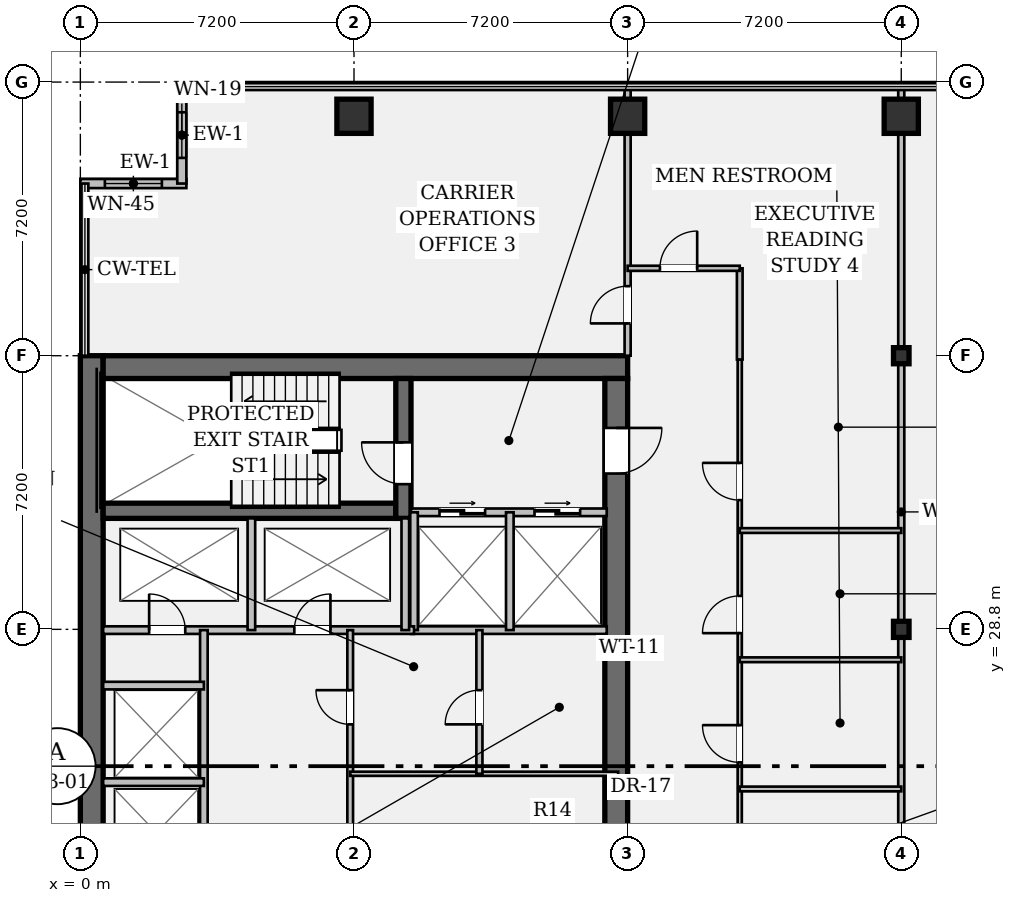
"""IFC4 building model, lengths in metres.
Left out: names, types, materials, properties, quantities, classifications, styles, units other than length and angle.
Written with IfcOpenShell. Run it as: python <this file> out.ifc"""

import sys

from ifc_helpers import new_model, si_unit, direction, frame, frame_2d, origin, origin_2d, place, context, subcontext, project, spatial, rectangle, hollow_rectangle, i_section, extrude, element, fill, save


model = new_model("IFC4")
c1 = context("Model", 3, precision=1e-05, world=origin(), true_north=direction((0.0, 1.0)))
c2 = subcontext(c1, "Body", "Model", "MODEL_VIEW")
j1 = project(units=[si_unit("LENGTHUNIT", "METRE"), si_unit("PLANEANGLEUNIT", "RADIAN")], contexts=[c1])
p1 = place(None, origin())
s1 = spatial("IfcSite", under=j1, at=p1, CompositionType="ELEMENT")
p2 = place(p1, origin())
s2 = spatial("IfcBuilding", under=s1, at=p2, CompositionType="ELEMENT")
p3 = place(p2, frame((0.0, 0.0, 129.15)))
s3 = spatial("IfcBuildingStorey", under=s2, at=p3, CompositionType="ELEMENT", Elevation=129.15)
p4 = place(p3, frame((0.3, 7.2, 0.0), z_axis=(0.0, 0.0, 1.0), x_axis=(0.0, 1.0, 0.0)))
e1 = element("IfcWall", 1, at=p4, inside=s3, PredefinedType="SHEAR", context=c2, shape_type="SweptSolid", body=[
    extrude(rectangle(XDim=28.8, YDim=0.6, at=frame_2d((14.4, 0.0))), origin(), (0.0, 0.0, 1.0), 3.58),
])
p5 = place(p3, frame((0.6, 35.7, 0.0), z_axis=(0.0, 0.0, 1.0), x_axis=(1.0, 0.0, 0.0)))
e2 = element("IfcWall", 2, at=p5, inside=s3, PredefinedType="SHEAR", context=c2, shape_type="SweptSolid", body=[
    extrude(rectangle(XDim=13.8, YDim=0.6, at=frame_2d((6.9, 0.0))), origin(), (0.0, 0.0, 1.0), 3.58),
])
p6 = place(p3, frame((14.1, 35.4, 0.0), z_axis=(0.0, 0.0, 1.0), x_axis=(0.0, -1.0, 0.0)))
e3 = element("IfcWall", 3, at=p6, inside=s3, PredefinedType="SHEAR", context=c2, shape_type="SweptSolid", body=[
    extrude(rectangle(XDim=27.6, YDim=0.6, at=frame_2d((13.8, 0.0))), origin(), (0.0, 0.0, 1.0), 3.58),
])
p7 = place(p6, frame((1.3, 0.0, 0.0)))
e4 = element("IfcOpeningElement", 4, at=p7, cuts=e3, PredefinedType="OPENING", context=c2, shape_type="SweptSolid", body=[
    extrude(rectangle(XDim=1.2, YDim=2.15, at=frame_2d((0.6, 1.075))), frame((0.0, 0.312, 0.0), z_axis=(0.0, -1.0, 0.0), x_axis=(1.0, 0.0, 0.0)), (0.0, 0.0, 1.0), 0.624),
])
p8 = place(p6, frame((25.25, 0.0, 0.0)))
e5 = element("IfcOpeningElement", 5, at=p8, cuts=e3, PredefinedType="OPENING", context=c2, shape_type="SweptSolid", body=[
    extrude(rectangle(XDim=1.2, YDim=2.15, at=frame_2d((0.6, 1.075))), frame((0.0, 0.312, 0.0), z_axis=(0.0, -1.0, 0.0), x_axis=(1.0, 0.0, 0.0)), (0.0, 0.0, 1.0), 0.624),
])
p9 = place(p6, frame((14.6, 0.0, 0.0)))
e6 = element("IfcOpeningElement", 6, at=p9, cuts=e3, PredefinedType="OPENING", context=c2, shape_type="SweptSolid", body=[
    extrude(rectangle(XDim=1.6, YDim=2.2, at=frame_2d((0.8, 1.1))), frame((0.0, 0.312, 0.0), z_axis=(0.0, -1.0, 0.0), x_axis=(1.0, 0.0, 0.0)), (0.0, 0.0, 1.0), 0.624),
])
p10 = place(p3, frame((0.6, 31.92, 0.0), z_axis=(0.0, 0.0, 1.0), x_axis=(1.0, 0.0, 0.0)))
e7 = element("IfcWall", 7, at=p10, inside=s3, PredefinedType="SHEAR", context=c2, shape_type="SweptSolid", body=[
    extrude(rectangle(XDim=7.7, YDim=0.4, at=frame_2d((3.85, 0.0))), origin(), (0.0, 0.0, 1.0), 3.58),
])
p11 = place(p3, frame((8.5, 31.72, 0.0), z_axis=(0.0, 0.0, 1.0), x_axis=(0.0, 1.0, 0.0)))
e8 = element("IfcWall", 8, at=p11, inside=s3, PredefinedType="SHEAR", context=c2, shape_type="SweptSolid", body=[
    extrude(rectangle(XDim=3.68, YDim=0.4, at=frame_2d((1.84, 0.0))), origin(), (0.0, 0.0, 1.0), 3.58),
])
p12 = place(p11, frame((0.9, 0.0, 0.0)))
e9 = element("IfcOpeningElement", 9, at=p12, cuts=e8, PredefinedType="OPENING", context=c2, shape_type="SweptSolid", body=[
    extrude(rectangle(XDim=1.1, YDim=2.15, at=frame_2d((0.55, 1.075))), frame((0.0, 0.212, 0.0), z_axis=(0.0, -1.0, 0.0), x_axis=(1.0, 0.0, 0.0)), (0.0, 0.0, 1.0), 0.424),
])
for number, where, z_axis, x_axis in (
    (10, (7.2, 42.3, 0.0), (0.0, 0.0, 1.0), (1.0, 0.0, 0.0)),
    (11, (14.4, 42.3, 0.0), (0.0, 0.0, 1.0), (1.0, 0.0, 0.0)),
):
    element("IfcColumn", number, at=place(p3, frame(where, z_axis=z_axis, x_axis=x_axis)), inside=s3, PredefinedType="COLUMN", context=c2, shape_type="SweptSolid", body=[
        extrude(hollow_rectangle(XDim=0.9, YDim=0.9, WallThickness=0.055, at=origin_2d()), origin(), (0.0, 0.0, 1.0), 3.58),
    ])
for number, where, z_axis, x_axis in (
    (12, (21.6, 28.8, 0.0), (0.0, 0.0, 1.0), (1.0, 0.0, 0.0)),
    (13, (21.6, 36.0, 0.0), (0.0, 0.0, 1.0), (1.0, 0.0, 0.0)),
):
    element("IfcColumn", number, at=place(p3, frame(where, z_axis=z_axis, x_axis=x_axis)), inside=s3, PredefinedType="COLUMN", context=c2, shape_type="SweptSolid", body=[
        extrude(i_section(OverallWidth=0.409, OverallDepth=0.424, WebThickness=0.033, FlangeThickness=0.052, FilletRadius=0.018, at=origin_2d()), origin(), (0.0, 0.0, 1.0), 3.58),
    ])
p13 = place(p3, frame((21.6, 42.3, 0.0), z_axis=(0.0, 0.0, 1.0), x_axis=(1.0, 0.0, 0.0)))
e14 = element("IfcColumn", 14, at=p13, inside=s3, PredefinedType="COLUMN", context=c2, shape_type="SweptSolid", body=[
    extrude(hollow_rectangle(XDim=0.9, YDim=0.9, WallThickness=0.055, at=origin_2d()), origin(), (0.0, 0.0, 1.0), 3.58),
])
p14 = place(p3, frame((0.0, 40.53, 0.0), z_axis=(0.0, 0.0, 1.0), x_axis=(1.0, 0.0, 0.0)))
e15 = element("IfcWall", 15, at=p14, inside=s3, PredefinedType="STANDARD", context=c2, shape_type="SweptSolid", body=[
    extrude(rectangle(XDim=2.79, YDim=0.24, at=frame_2d((1.395, 0.0))), origin(), (0.0, 0.0, 1.0), 3.58),
])
p15 = place(p14, frame((0.645, 0.0, 0.95)))
e16 = element("IfcOpeningElement", 16, at=p15, cuts=e15, PredefinedType="OPENING", context=c2, shape_type="SweptSolid", body=[
    extrude(rectangle(XDim=1.5, YDim=1.8, at=frame_2d((0.75, 0.9))), frame((0.0, 0.132, 0.0), z_axis=(0.0, -1.0, 0.0), x_axis=(1.0, 0.0, 0.0)), (0.0, 0.0, 1.0), 0.264),
])
p16 = place(p3, frame((2.67, 40.53, 0.0), z_axis=(0.0, 0.0, 1.0), x_axis=(0.0, 1.0, 0.0)))
e17 = element("IfcWall", 17, at=p16, inside=s3, PredefinedType="STANDARD", context=c2, shape_type="SweptSolid", body=[
    extrude(rectangle(XDim=2.55, YDim=0.24, at=frame_2d((1.275, 0.0))), origin(), (0.0, 0.0, 1.0), 3.58),
])
p17 = place(p16, frame((0.675, 0.0, 0.95)))
e18 = element("IfcOpeningElement", 18, at=p17, cuts=e17, PredefinedType="OPENING", context=c2, shape_type="SweptSolid", body=[
    extrude(rectangle(XDim=1.2, YDim=1.8, at=frame_2d((0.6, 0.9))), frame((0.0, 0.132, 0.0), z_axis=(0.0, -1.0, 0.0), x_axis=(1.0, 0.0, 0.0)), (0.0, 0.0, 1.0), 0.264),
])
p18 = place(p3, frame((8.7, 31.88, 0.0), z_axis=(0.0, 0.0, 1.0), x_axis=(1.0, 0.0, 0.0)))
e19 = element("IfcWall", 19, at=p18, inside=s3, PredefinedType="PARTITIONING", context=c2, shape_type="SweptSolid", body=[
    extrude(rectangle(XDim=5.15, YDim=0.2, at=frame_2d((2.575, 0.0))), origin(), (0.0, 0.0, 1.0), 3.58),
])
p19 = place(p18, frame((0.75, 0.0, 0.0)))
e20 = element("IfcOpeningElement", 20, at=p19, cuts=e19, PredefinedType="OPENING", context=c2, shape_type="SweptSolid", body=[
    extrude(rectangle(XDim=1.2, YDim=2.2, at=frame_2d((0.6, 1.1))), frame((0.0, 0.112, 0.0), z_axis=(0.0, -1.0, 0.0), x_axis=(1.0, 0.0, 0.0)), (0.0, 0.0, 1.0), 0.224),
])
p20 = place(p18, frame((3.25, 0.0, 0.0)))
e21 = element("IfcOpeningElement", 21, at=p20, cuts=e19, PredefinedType="OPENING", context=c2, shape_type="SweptSolid", body=[
    extrude(rectangle(XDim=1.2, YDim=2.2, at=frame_2d((0.6, 1.1))), frame((0.0, 0.112, 0.0), z_axis=(0.0, -1.0, 0.0), x_axis=(1.0, 0.0, 0.0)), (0.0, 0.0, 1.0), 0.224),
])
p21 = place(p3, frame((8.7, 28.78, 0.0), z_axis=(0.0, 0.0, 1.0), x_axis=(1.0, 0.0, 0.0)))
e22 = element("IfcWall", 22, at=p21, inside=s3, PredefinedType="PARTITIONING", context=c2, shape_type="SweptSolid", body=[
    extrude(rectangle(XDim=5.15, YDim=0.2, at=frame_2d((2.575, 0.0))), origin(), (0.0, 0.0, 1.0), 3.58),
])
for number, where, z_axis, x_axis in (
    (23, (8.78, 28.78, 0.0), (0.0, 0.0, 1.0), (0.0, 1.0, 0.0)),
    (24, (11.3, 28.78, 0.0), (0.0, 0.0, 1.0), (0.0, 1.0, 0.0)),
):
    element("IfcWall", number, at=place(p3, frame(where, z_axis=z_axis, x_axis=x_axis)), inside=s3, PredefinedType="PARTITIONING", context=c2, shape_type="SweptSolid", body=[
        extrude(rectangle(XDim=3.1, YDim=0.2, at=frame_2d((1.55, 0.0))), origin(), (0.0, 0.0, 1.0), 3.58),
    ])
p22 = place(p3, frame((0.6, 28.78, 0.0), z_axis=(0.0, 0.0, 1.0), x_axis=(1.0, 0.0, 0.0)))
e25 = element("IfcWall", 25, at=p22, inside=s3, PredefinedType="PARTITIONING", context=c2, shape_type="SweptSolid", body=[
    extrude(rectangle(XDim=8.18, YDim=0.2, at=frame_2d((4.09, 0.0))), origin(), (0.0, 0.0, 1.0), 3.58),
])
p23 = place(p22, frame((1.21, 0.0, 0.0)))
e26 = element("IfcOpeningElement", 26, at=p23, cuts=e25, PredefinedType="OPENING", context=c2, shape_type="SweptSolid", body=[
    extrude(rectangle(XDim=0.95, YDim=2.15, at=frame_2d((0.475, 1.075))), frame((0.0, 0.112, 0.0), z_axis=(0.0, -1.0, 0.0), x_axis=(1.0, 0.0, 0.0)), (0.0, 0.0, 1.0), 0.224),
])
p24 = place(p22, frame((5.03, 0.0, 0.0)))
e27 = element("IfcOpeningElement", 27, at=p24, cuts=e25, PredefinedType="OPENING", context=c2, shape_type="SweptSolid", body=[
    extrude(rectangle(XDim=0.95, YDim=2.15, at=frame_2d((0.475, 1.075))), frame((0.0, 0.112, 0.0), z_axis=(0.0, -1.0, 0.0), x_axis=(1.0, 0.0, 0.0)), (0.0, 0.0, 1.0), 0.224),
])
for number, where, z_axis, x_axis in (
    (28, (4.5, 28.78, 0.0), (0.0, 0.0, 1.0), (0.0, 1.0, 0.0)),
    (29, (8.55, 28.78, 0.0), (0.0, 0.0, 1.0), (0.0, 1.0, 0.0)),
):
    element("IfcWall", number, at=place(p3, frame(where, z_axis=z_axis, x_axis=x_axis)), inside=s3, PredefinedType="PARTITIONING", context=c2, shape_type="SweptSolid", body=[
        extrude(rectangle(XDim=2.94, YDim=0.2, at=frame_2d((1.47, 0.0))), origin(), (0.0, 0.0, 1.0), 3.58),
    ])
p25 = place(p3, frame((3.25, 15.7, 0.0), z_axis=(0.0, 0.0, 1.0), x_axis=(0.0, 1.0, 0.0)))
e30 = element("IfcWall", 30, at=p25, inside=s3, PredefinedType="PARTITIONING", context=c2, shape_type="SweptSolid", body=[
    extrude(rectangle(XDim=13.08, YDim=0.2, at=frame_2d((6.54, 0.0))), origin(), (0.0, 0.0, 1.0), 3.58),
])
for number, where, z_axis, x_axis in (
    (31, (0.6, 24.78, 0.0), (0.0, 0.0, 1.0), (1.0, 0.0, 0.0)),
    (32, (0.6, 27.32, 0.0), (0.0, 0.0, 1.0), (1.0, 0.0, 0.0)),
):
    element("IfcWall", number, at=place(p3, frame(where, z_axis=z_axis, x_axis=x_axis)), inside=s3, PredefinedType="PARTITIONING", context=c2, shape_type="SweptSolid", body=[
        extrude(rectangle(XDim=2.65, YDim=0.2, at=frame_2d((1.325, 0.0))), origin(), (0.0, 0.0, 1.0), 3.58),
    ])
p26 = place(p3, frame((7.1, 22.2, 0.0), z_axis=(0.0, 0.0, 1.0), x_axis=(0.0, 1.0, 0.0)))
e33 = element("IfcWall", 33, at=p26, inside=s3, PredefinedType="PARTITIONING", context=c2, shape_type="SweptSolid", body=[
    extrude(rectangle(XDim=6.58, YDim=0.15, at=frame_2d((3.29, 0.0))), origin(), (0.0, 0.0, 1.0), 3.58),
])
p27 = place(p26, frame((4.1, 0.0, 0.0)))
e34 = element("IfcOpeningElement", 34, at=p27, cuts=e33, PredefinedType="OPENING", context=c2, shape_type="SweptSolid", body=[
    extrude(rectangle(XDim=0.9, YDim=2.15, at=frame_2d((0.45, 1.075))), frame((0.0, 0.087, 0.0), z_axis=(0.0, -1.0, 0.0), x_axis=(1.0, 0.0, 0.0)), (0.0, 0.0, 1.0), 0.174),
])
p28 = place(p3, frame((7.1, 25.0, 0.0), z_axis=(0.0, 0.0, 1.0), x_axis=(1.0, 0.0, 0.0)))
e35 = element("IfcWall", 35, at=p28, inside=s3, PredefinedType="PARTITIONING", context=c2, shape_type="SweptSolid", body=[
    extrude(rectangle(XDim=7.05, YDim=0.11, at=frame_2d((3.525, 0.0))), origin(), (0.0, 0.0, 1.0), 3.58),
])
p29 = place(p3, frame((10.5, 25.0, 0.0), z_axis=(0.0, 0.0, 1.0), x_axis=(0.0, 1.0, 0.0)))
e36 = element("IfcWall", 36, at=p29, inside=s3, PredefinedType="PARTITIONING", context=c2, shape_type="SweptSolid", body=[
    extrude(rectangle(XDim=3.78, YDim=0.16, at=frame_2d((1.89, 0.0))), origin(), (0.0, 0.0, 1.0), 3.58),
])
p30 = place(p29, frame((1.3, 0.0, 0.0)))
e37 = element("IfcOpeningElement", 37, at=p30, cuts=e36, PredefinedType="OPENING", context=c2, shape_type="SweptSolid", body=[
    extrude(rectangle(XDim=0.9, YDim=2.15, at=frame_2d((0.45, 1.075))), frame((0.0, 0.092, 0.0), z_axis=(0.0, -1.0, 0.0), x_axis=(1.0, 0.0, 0.0)), (0.0, 0.0, 1.0), 0.184),
])
p31 = place(p3, frame((17.35, 20.7, 0.0), z_axis=(0.0, 0.0, 1.0), x_axis=(0.0, 1.0, 0.0)))
e38 = element("IfcWall", 38, at=p31, inside=s3, PredefinedType="PARTITIONING", context=c2, shape_type="SweptSolid", body=[
    extrude(rectangle(XDim=15.2, YDim=0.11, at=frame_2d((7.6, 0.0))), origin(), (0.0, 0.0, 1.0), 2.869),
])
p32 = place(p31, frame((1.4, 0.0, 0.0)))
e39 = element("IfcOpeningElement", 39, at=p32, cuts=e38, PredefinedType="OPENING", context=c2, shape_type="SweptSolid", body=[
    extrude(rectangle(XDim=0.98, YDim=2.15, at=frame_2d((0.49, 1.075))), frame((0.0, 0.067, 0.0), z_axis=(0.0, -1.0, 0.0), x_axis=(1.0, 0.0, 0.0)), (0.0, 0.0, 1.0), 0.134),
])
p33 = place(p31, frame((4.6, 0.0, 0.0)))
e40 = element("IfcOpeningElement", 40, at=p33, cuts=e38, PredefinedType="OPENING", context=c2, shape_type="SweptSolid", body=[
    extrude(rectangle(XDim=0.98, YDim=2.15, at=frame_2d((0.49, 1.075))), frame((0.0, 0.067, 0.0), z_axis=(0.0, -1.0, 0.0), x_axis=(1.0, 0.0, 0.0)), (0.0, 0.0, 1.0), 0.134),
])
p34 = place(p31, frame((8.0, 0.0, 0.0)))
e41 = element("IfcOpeningElement", 41, at=p34, cuts=e38, PredefinedType="OPENING", context=c2, shape_type="SweptSolid", body=[
    extrude(rectangle(XDim=0.98, YDim=2.15, at=frame_2d((0.49, 1.075))), frame((0.0, 0.067, 0.0), z_axis=(0.0, -1.0, 0.0), x_axis=(1.0, 0.0, 0.0)), (0.0, 0.0, 1.0), 0.134),
])
p35 = place(p31, frame((11.5, 0.0, 0.0)))
e42 = element("IfcOpeningElement", 42, at=p35, cuts=e38, PredefinedType="OPENING", context=c2, shape_type="SweptSolid", body=[
    extrude(rectangle(XDim=0.98, YDim=2.15, at=frame_2d((0.49, 1.075))), frame((0.0, 0.067, 0.0), z_axis=(0.0, -1.0, 0.0), x_axis=(1.0, 0.0, 0.0)), (0.0, 0.0, 1.0), 0.134),
])
p36 = place(p3, frame((21.6, 20.7, 0.0), z_axis=(0.0, 0.0, 1.0), x_axis=(0.0, 1.0, 0.0)))
e43 = element("IfcWall", 43, at=p36, inside=s3, PredefinedType="PARTITIONING", context=c2, shape_type="SweptSolid", body=[
    extrude(rectangle(XDim=22.38, YDim=0.16, at=frame_2d((11.19, 0.0))), origin(), (0.0, 0.0, 1.0), 2.869),
])
for number, where, z_axis, x_axis in (
    (44, (17.35, 24.6, 0.0), (0.0, 0.0, 1.0), (1.0, 0.0, 0.0)),
    (45, (17.35, 28.0, 0.0), (0.0, 0.0, 1.0), (1.0, 0.0, 0.0)),
    (46, (17.35, 31.4, 0.0), (0.0, 0.0, 1.0), (1.0, 0.0, 0.0)),
):
    element("IfcWall", number, at=place(p3, frame(where, z_axis=z_axis, x_axis=x_axis)), inside=s3, PredefinedType="PARTITIONING", context=c2, shape_type="SweptSolid", body=[
        extrude(rectangle(XDim=4.25, YDim=0.125, at=frame_2d((2.125, 0.0))), origin(), (0.0, 0.0, 1.0), 2.869),
    ])
p37 = place(p3, frame((14.4, 36.0, 0.0), z_axis=(0.0, 0.0, 1.0), x_axis=(0.0, 1.0, 0.0)))
e47 = element("IfcWall", 47, at=p37, inside=s3, PredefinedType="PARTITIONING", context=c2, shape_type="SweptSolid", body=[
    extrude(rectangle(XDim=7.08, YDim=0.16, at=frame_2d((3.54, 0.0))), origin(), (0.0, 0.0, 1.0), 2.869),
])
p38 = place(p37, frame((0.85, 0.0, 0.0)))
e48 = element("IfcOpeningElement", 48, at=p38, cuts=e47, PredefinedType="OPENING", context=c2, shape_type="SweptSolid", body=[
    extrude(rectangle(XDim=0.98, YDim=2.15, at=frame_2d((0.49, 1.075))), frame((0.0, 0.092, 0.0), z_axis=(0.0, -1.0, 0.0), x_axis=(1.0, 0.0, 0.0)), (0.0, 0.0, 1.0), 0.184),
])
p39 = place(p3, frame((17.35, 35.9, 0.0), z_axis=(0.0, 0.0, 1.0), x_axis=(0.0, 1.0, 0.0)))
e49 = element("IfcWall", 49, at=p39, inside=s3, PredefinedType="PARTITIONING", context=c2, shape_type="SweptSolid", body=[
    extrude(rectangle(XDim=2.4, YDim=0.15, at=frame_2d((1.2, 0.0))), origin(), (0.0, 0.0, 1.0), 2.869),
])
p40 = place(p3, frame((14.4, 38.3, 0.0), z_axis=(0.0, 0.0, 1.0), x_axis=(1.0, 0.0, 0.0)))
e50 = element("IfcWall", 50, at=p40, inside=s3, PredefinedType="PARTITIONING", context=c2, shape_type="SweptSolid", body=[
    extrude(rectangle(XDim=2.95, YDim=0.135, at=frame_2d((1.475, 0.0))), origin(), (0.0, 0.0, 1.0), 3.148),
])
p41 = place(p40, frame((0.85, 0.0, 0.0)))
e51 = element("IfcOpeningElement", 51, at=p41, cuts=e50, PredefinedType="OPENING", context=c2, shape_type="SweptSolid", body=[
    extrude(rectangle(XDim=0.98, YDim=2.15, at=frame_2d((0.49, 1.075))), frame((0.0, 0.08, 0.0), z_axis=(0.0, -1.0, 0.0), x_axis=(1.0, 0.0, 0.0)), (0.0, 0.0, 1.0), 0.159),
])
p42 = place(p15, origin())
e52 = element("IfcWindow", 52, at=p42, inside=s3, PartitioningType="SINGLE_PANEL", PredefinedType="WINDOW", context=c2, shape_type="SweptSolid", body=[
    extrude(rectangle(XDim=1.5, YDim=1.8, at=frame_2d((0.75, 0.9))), frame((0.0, 0.03, 0.0), z_axis=(0.0, -1.0, 0.0), x_axis=(1.0, 0.0, 0.0)), (0.0, 0.0, 1.0), 0.06),
])
fill(e16, e52)
p43 = place(p17, origin())
e53 = element("IfcWindow", 53, at=p43, inside=s3, PartitioningType="SINGLE_PANEL", PredefinedType="WINDOW", context=c2, shape_type="SweptSolid", body=[
    extrude(rectangle(XDim=1.2, YDim=1.8, at=frame_2d((0.6, 0.9))), frame((0.0, 0.03, 0.0), z_axis=(0.0, -1.0, 0.0), x_axis=(1.0, 0.0, 0.0)), (0.0, 0.0, 1.0), 0.06),
])
fill(e18, e53)
p44 = place(p12, origin())
e54 = element("IfcDoor", 54, at=p44, inside=s3, OperationType="SINGLE_SWING_RIGHT", PredefinedType="DOOR", context=c2, shape_type="SweptSolid", body=[
    extrude(rectangle(XDim=1.1, YDim=2.15, at=frame_2d((0.55, 1.075))), frame((0.0, 0.025, 0.0), z_axis=(0.0, -1.0, 0.0), x_axis=(1.0, 0.0, 0.0)), (0.0, 0.0, 1.0), 0.05),
])
fill(e9, e54)
p45 = place(p7, origin())
e55 = element("IfcDoor", 55, at=p45, inside=s3, OperationType="SINGLE_SWING_LEFT", PredefinedType="DOOR", context=c2, shape_type="SweptSolid", body=[
    extrude(rectangle(XDim=1.2, YDim=2.15, at=frame_2d((0.6, 1.075))), frame((0.0, 0.025, 0.0), z_axis=(0.0, -1.0, 0.0), x_axis=(1.0, 0.0, 0.0)), (0.0, 0.0, 1.0), 0.05),
])
fill(e4, e55)
p46 = place(p19, origin())
e56 = element("IfcDoor", 56, at=p46, inside=s3, OperationType="DOUBLE_DOOR_SLIDING", PredefinedType="DOOR", context=c2, shape_type="SweptSolid", body=[
    extrude(rectangle(XDim=1.2, YDim=2.2, at=frame_2d((0.6, 1.1))), frame((0.0, 0.025, 0.0), z_axis=(0.0, -1.0, 0.0), x_axis=(1.0, 0.0, 0.0)), (0.0, 0.0, 1.0), 0.05),
])
fill(e20, e56)
p47 = place(p20, origin())
e57 = element("IfcDoor", 57, at=p47, inside=s3, OperationType="DOUBLE_DOOR_SLIDING", PredefinedType="DOOR", context=c2, shape_type="SweptSolid", body=[
    extrude(rectangle(XDim=1.2, YDim=2.2, at=frame_2d((0.6, 1.1))), frame((0.0, 0.025, 0.0), z_axis=(0.0, -1.0, 0.0), x_axis=(1.0, 0.0, 0.0)), (0.0, 0.0, 1.0), 0.05),
])
fill(e21, e57)
p48 = place(p23, origin())
e58 = element("IfcDoor", 58, at=p48, inside=s3, OperationType="SINGLE_SWING_LEFT", PredefinedType="DOOR", context=c2, shape_type="SweptSolid", body=[
    extrude(rectangle(XDim=0.95, YDim=2.15, at=frame_2d((0.475, 1.075))), frame((0.0, 0.025, 0.0), z_axis=(0.0, -1.0, 0.0), x_axis=(1.0, 0.0, 0.0)), (0.0, 0.0, 1.0), 0.05),
])
fill(e26, e58)
p49 = place(p24, origin())
e59 = element("IfcDoor", 59, at=p49, inside=s3, OperationType="SINGLE_SWING_RIGHT", PredefinedType="DOOR", context=c2, shape_type="SweptSolid", body=[
    extrude(rectangle(XDim=0.95, YDim=2.15, at=frame_2d((0.475, 1.075))), frame((0.0, 0.025, 0.0), z_axis=(0.0, -1.0, 0.0), x_axis=(1.0, 0.0, 0.0)), (0.0, 0.0, 1.0), 0.05),
])
fill(e27, e59)
p50 = place(p27, origin())
e60 = element("IfcDoor", 60, at=p50, inside=s3, OperationType="SINGLE_SWING_RIGHT", PredefinedType="DOOR", context=c2, shape_type="SweptSolid", body=[
    extrude(rectangle(XDim=0.9, YDim=2.15, at=frame_2d((0.45, 1.075))), frame((0.0, 0.025, 0.0), z_axis=(0.0, -1.0, 0.0), x_axis=(1.0, 0.0, 0.0)), (0.0, 0.0, 1.0), 0.05),
])
fill(e34, e60)
p51 = place(p30, origin())
e61 = element("IfcDoor", 61, at=p51, inside=s3, OperationType="SINGLE_SWING_LEFT", PredefinedType="DOOR", context=c2, shape_type="SweptSolid", body=[
    extrude(rectangle(XDim=0.9, YDim=2.15, at=frame_2d((0.45, 1.075))), frame((0.0, 0.025, 0.0), z_axis=(0.0, -1.0, 0.0), x_axis=(1.0, 0.0, 0.0)), (0.0, 0.0, 1.0), 0.05),
])
fill(e37, e61)
p52 = place(p33, origin())
e62 = element("IfcDoor", 62, at=p52, inside=s3, OperationType="SINGLE_SWING_RIGHT", PredefinedType="DOOR", context=c2, shape_type="SweptSolid", body=[
    extrude(rectangle(XDim=0.98, YDim=2.15, at=frame_2d((0.49, 1.075))), frame((0.0, 0.025, 0.0), z_axis=(0.0, -1.0, 0.0), x_axis=(1.0, 0.0, 0.0)), (0.0, 0.0, 1.0), 0.05),
])
fill(e40, e62)
p53 = place(p34, origin())
e63 = element("IfcDoor", 63, at=p53, inside=s3, OperationType="SINGLE_SWING_LEFT", PredefinedType="DOOR", context=c2, shape_type="SweptSolid", body=[
    extrude(rectangle(XDim=0.98, YDim=2.15, at=frame_2d((0.49, 1.075))), frame((0.0, 0.025, 0.0), z_axis=(0.0, -1.0, 0.0), x_axis=(1.0, 0.0, 0.0)), (0.0, 0.0, 1.0), 0.05),
])
fill(e41, e63)
p54 = place(p35, origin())
e64 = element("IfcDoor", 64, at=p54, inside=s3, OperationType="SINGLE_SWING_RIGHT", PredefinedType="DOOR", context=c2, shape_type="SweptSolid", body=[
    extrude(rectangle(XDim=0.98, YDim=2.15, at=frame_2d((0.49, 1.075))), frame((0.0, 0.025, 0.0), z_axis=(0.0, -1.0, 0.0), x_axis=(1.0, 0.0, 0.0)), (0.0, 0.0, 1.0), 0.05),
])
fill(e42, e64)
p55 = place(p38, origin())
e65 = element("IfcDoor", 65, at=p55, inside=s3, OperationType="SINGLE_SWING_LEFT", PredefinedType="DOOR", context=c2, shape_type="SweptSolid", body=[
    extrude(rectangle(XDim=0.98, YDim=2.15, at=frame_2d((0.49, 1.075))), frame((0.0, 0.025, 0.0), z_axis=(0.0, -1.0, 0.0), x_axis=(1.0, 0.0, 0.0)), (0.0, 0.0, 1.0), 0.05),
])
fill(e48, e65)
p56 = place(p41, origin())
e66 = element("IfcDoor", 66, at=p56, inside=s3, OperationType="SINGLE_SWING_RIGHT", PredefinedType="DOOR", context=c2, shape_type="SweptSolid", body=[
    extrude(rectangle(XDim=0.98, YDim=2.15, at=frame_2d((0.49, 1.075))), frame((0.0, 0.025, 0.0), z_axis=(0.0, -1.0, 0.0), x_axis=(1.0, 0.0, 0.0)), (0.0, 0.0, 1.0), 0.05),
])
fill(e51, e66)
save(model, sys.argv[1])
